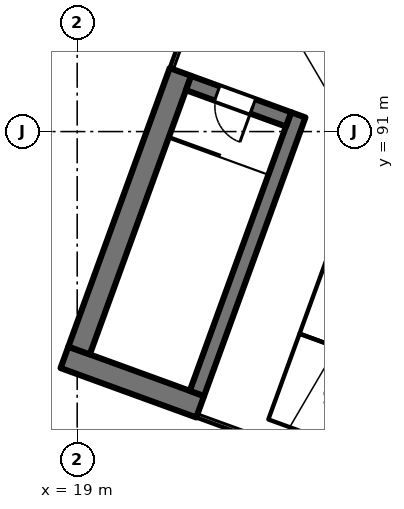
"""IFC4 building model, lengths in metres.
Left out: names, types, materials, properties, quantities, classifications, styles, units other than length and angle.
Written with IfcOpenShell. Run it as: python <this file> out.ifc"""

import sys

from ifc_helpers import new_model, si_unit, direction, frame, frame_2d, origin, place, context, subcontext, project, spatial, rectangle, extrude, element, fill, save


model = new_model("IFC4")
c1 = context("Model", 3, precision=1e-05, world=origin(), true_north=direction((0.0, 1.0)))
c2 = subcontext(c1, "Body", "Model", "MODEL_VIEW")
j1 = project(units=[si_unit("LENGTHUNIT", "METRE"), si_unit("PLANEANGLEUNIT", "RADIAN")], contexts=[c1])
p1 = place(None, origin())
s1 = spatial("IfcSite", under=j1, at=p1, CompositionType="ELEMENT")
p2 = place(p1, origin())
s2 = spatial("IfcBuilding", under=s1, at=p2, CompositionType="ELEMENT")
p3 = place(p2, frame((0.0, 0.0, 236.0)))
s3 = spatial("IfcBuildingStorey", under=s2, at=p3, CompositionType="ELEMENT", Elevation=236.0)
p4 = place(p3, frame((22.236, 83.76, 0.0), z_axis=(0.0, 0.0, 1.0), x_axis=(-0.939680822529, 0.342052557032, 0.0)))
e1 = element("IfcWall", 1, at=p4, inside=s3, PredefinedType="SHEAR", context=c2, shape_type="SweptSolid", body=[
    extrude(rectangle(XDim=3.8, YDim=0.6, at=frame_2d((1.9, 0.0))), origin(), (0.0, 0.0, 1.0), 5.5),
])
p5 = place(p3, frame((19.05, 85.239, 0.0), z_axis=(0.0, 0.0, 1.0), x_axis=(0.342016982193, 0.939693771338, 0.0)))
e2 = element("IfcWall", 2, at=p5, inside=s3, PredefinedType="SHEAR", context=c2, shape_type="SweptSolid", body=[
    extrude(rectangle(XDim=7.8, YDim=0.6, at=frame_2d((3.9, 0.0))), origin(), (0.0, 0.0, 1.0), 5.5),
])
p6 = place(p3, frame((22.15, 84.11, 0.0), z_axis=(0.0, 0.0, 1.0), x_axis=(0.342016982193, 0.939693771338, 0.0)))
e3 = element("IfcWall", 3, at=p6, inside=s3, PredefinedType="SHEAR", context=c2, shape_type="SweptSolid", body=[
    extrude(rectangle(XDim=7.8, YDim=0.4, at=frame_2d((3.9, 0.0))), origin(), (0.0, 0.0, 1.0), 5.5),
])
p7 = place(p3, frame((24.562, 91.32, 0.0), z_axis=(0.0, 0.0, 1.0), x_axis=(-0.939717030584, 0.341953070509, 0.0)))
e4 = element("IfcWall", 4, at=p7, inside=s3, PredefinedType="SHEAR", context=c2, shape_type="SweptSolid", body=[
    extrude(rectangle(XDim=2.8, YDim=0.4, at=frame_2d((1.4, 0.0))), origin(), (0.0, 0.0, 1.0), 5.5),
])
p8 = place(p7, frame((1.0, 0.0, 0.0)))
e5 = element("IfcOpeningElement", 5, at=p8, cuts=e4, PredefinedType="OPENING", context=c2, shape_type="SweptSolid", body=[
    extrude(rectangle(XDim=1.0, YDim=2.1, at=frame_2d((0.5, 1.05))), frame((0.0, 0.21, 0.0), z_axis=(0.0, -1.0, 0.0), x_axis=(1.0, 0.0, 0.0)), (0.0, 0.0, 1.0), 0.42),
])
p9 = place(p8, origin())
e6 = element("IfcDoor", 6, at=p9, inside=s3, OperationType="SINGLE_SWING_LEFT", PredefinedType="DOOR", context=c2, shape_type="SweptSolid", body=[
    extrude(rectangle(XDim=1.0, YDim=2.1, at=frame_2d((0.5, 1.05))), frame((0.0, 0.025, 0.0), z_axis=(0.0, -1.0, 0.0), x_axis=(1.0, 0.0, 0.0)), (0.0, 0.0, 1.0), 0.05),
])
fill(e5, e6)
save(model, sys.argv[1])
